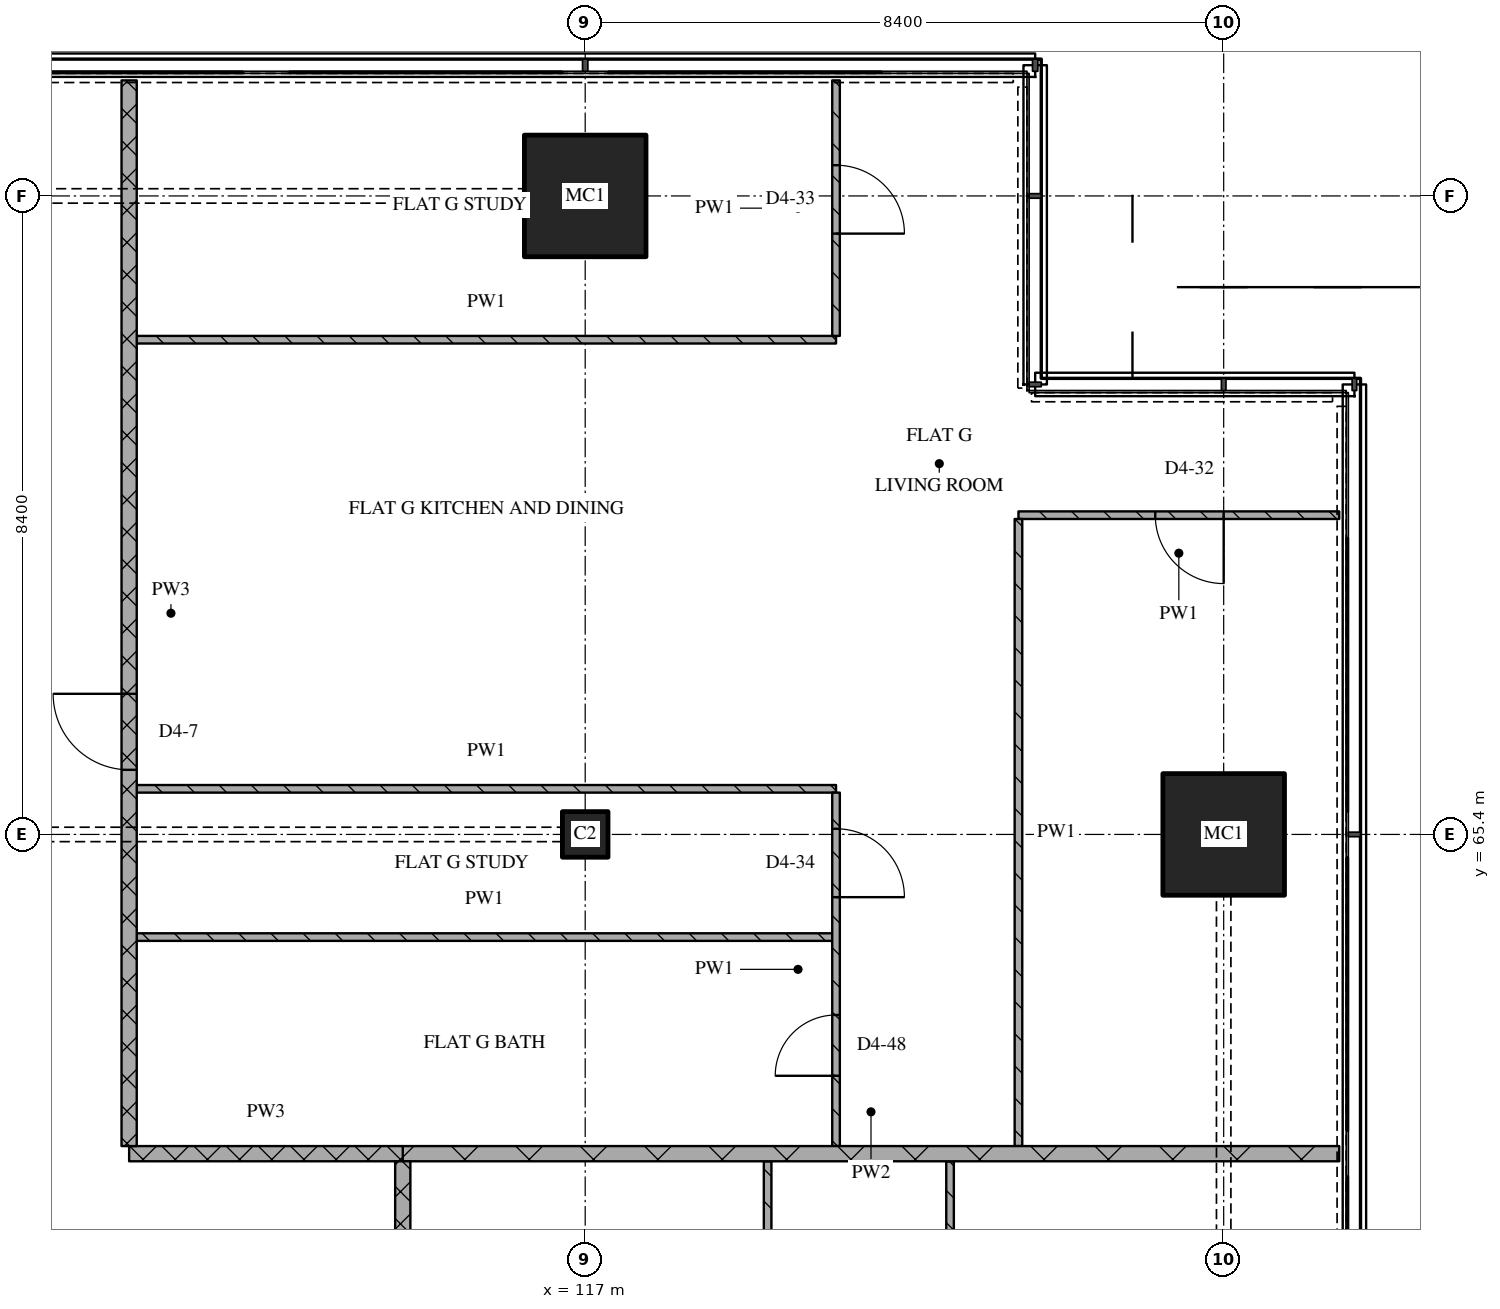
"""IFC4 building model, lengths in metres.
Left out: names, types, materials, properties, quantities, classifications, styles, units other than length and angle.
Written with IfcOpenShell. Run it as: python <this file> out.ifc"""

import sys

from ifc_helpers import new_model, si_unit, direction, frame, frame_2d, origin, origin_2d, place, context, subcontext, project, spatial, rectangle, extrude, element, fill, save


model = new_model("IFC4")
c1 = context("Model", 3, precision=1e-05, world=origin(), true_north=direction((0.0, 1.0)))
c2 = subcontext(c1, "Body", "Model", "MODEL_VIEW")
j1 = project(units=[si_unit("LENGTHUNIT", "METRE"), si_unit("PLANEANGLEUNIT", "RADIAN")], contexts=[c1])
p1 = place(None, origin())
s1 = spatial("IfcSite", under=j1, at=p1, CompositionType="ELEMENT")
p2 = place(p1, origin())
s2 = spatial("IfcBuilding", under=s1, at=p2, CompositionType="ELEMENT")
p3 = place(p2, frame((0.0, 0.0, 245.1)))
s3 = spatial("IfcBuildingStorey", under=s2, at=p3, CompositionType="ELEMENT", Elevation=245.1)
p4 = place(p3, frame((117.0, 65.4, 0.0), z_axis=(0.0, 0.0, 1.0), x_axis=(1.0, 0.0, 0.0)))
e1 = element("IfcColumn", 1, at=p4, inside=s3, PredefinedType="COLUMN", context=c2, shape_type="SweptSolid", body=[
    extrude(rectangle(XDim=0.6, YDim=0.6, at=origin_2d()), origin(), (0.0, 0.0, 1.0), 3.6),
])
for number, where, z_axis, x_axis in (
    (2, (117.0, 73.8, 0.0), (0.0, 0.0, 1.0), (1.0, 0.0, 0.0)),
    (3, (125.4, 65.4, 0.0), (0.0, 0.0, 1.0), (1.0, 0.0, 0.0)),
):
    element("IfcColumn", number, at=place(p3, frame(where, z_axis=z_axis, x_axis=x_axis)), inside=s3, PredefinedType="COLUMN", context=c2, shape_type="SweptSolid", body=[
        extrude(rectangle(XDim=1.6, YDim=1.6, at=origin_2d()), origin(), (0.0, 0.0, 1.0), 3.6),
    ])
p5 = place(p3, frame((111.0, 61.2, 0.0), z_axis=(0.0, 0.0, 1.0), x_axis=(1.0, 0.0, 0.0)))
e4 = element("IfcWall", 4, at=p5, inside=s3, PredefinedType="PARTITIONING", context=c2, shape_type="SweptSolid", body=[
    extrude(rectangle(XDim=3.6, YDim=0.2, at=frame_2d((1.8, 0.0))), origin(), (0.0, 0.0, 1.0), 3.32),
])
p6 = place(p3, frame((114.6, 61.2, 0.0), z_axis=(0.0, 0.0, 1.0), x_axis=(1.0, 0.0, 0.0)))
e5 = element("IfcWall", 5, at=p6, inside=s3, PredefinedType="PARTITIONING", context=c2, shape_type="SweptSolid", body=[
    extrude(rectangle(XDim=12.32, YDim=0.2, at=frame_2d((6.16, 0.0))), origin(), (0.0, 0.0, 1.0), 3.32),
])
p7 = place(p3, frame((111.1, 64.05, 0.0), z_axis=(0.0, 0.0, 1.0), x_axis=(1.0, 0.0, 0.0)))
e6 = element("IfcWall", 6, at=p7, inside=s3, PredefinedType="PARTITIONING", context=c2, shape_type="SweptSolid", body=[
    extrude(rectangle(XDim=9.15, YDim=0.1, at=frame_2d((4.575, 0.0))), origin(), (0.0, 0.0, 1.0), 3.32),
])
p8 = place(p3, frame((111.1, 66.0, 0.0), z_axis=(0.0, 0.0, 1.0), x_axis=(1.0, 0.0, 0.0)))
e7 = element("IfcWall", 7, at=p8, inside=s3, PredefinedType="PARTITIONING", context=c2, shape_type="SweptSolid", body=[
    extrude(rectangle(XDim=9.2, YDim=0.1, at=frame_2d((4.6, 0.0))), origin(), (0.0, 0.0, 1.0), 3.32),
])
p9 = place(p3, frame((126.92, 69.6, 0.0), z_axis=(0.0, 0.0, 1.0), x_axis=(-1.0, 0.0, 0.0)))
e8 = element("IfcWall", 8, at=p9, inside=s3, PredefinedType="PARTITIONING", context=c2, shape_type="SweptSolid", body=[
    extrude(rectangle(XDim=4.22, YDim=0.1, at=frame_2d((2.11, 0.0))), origin(), (0.0, 0.0, 1.0), 3.32),
])
p10 = place(p9, frame((1.52, 0.0, 0.0)))
e9 = element("IfcOpeningElement", 9, at=p10, cuts=e8, PredefinedType="OPENING", context=c2, shape_type="SweptSolid", body=[
    extrude(rectangle(XDim=0.9, YDim=2.1, at=frame_2d((0.45, 1.05))), frame((0.0, 0.06, 0.0), z_axis=(0.0, -1.0, 0.0), x_axis=(1.0, 0.0, 0.0)), (0.0, 0.0, 1.0), 0.12),
])
p11 = place(p3, frame((111.1, 71.909, 0.0), z_axis=(0.0, 0.0, 1.0), x_axis=(1.0, 0.0, 0.0)))
e10 = element("IfcWall", 10, at=p11, inside=s3, PredefinedType="PARTITIONING", context=c2, shape_type="SweptSolid", body=[
    extrude(rectangle(XDim=9.2, YDim=0.1, at=frame_2d((4.6, 0.0))), origin(), (0.0, 0.0, 1.0), 3.32),
])
p12 = place(p3, frame((111.0, 75.32, 0.0), z_axis=(0.0, 0.0, 1.0), x_axis=(0.0, -1.0, 0.0)))
e11 = element("IfcWall", 11, at=p12, inside=s3, PredefinedType="PARTITIONING", context=c2, shape_type="SweptSolid", body=[
    extrude(rectangle(XDim=14.02, YDim=0.2, at=frame_2d((7.01, 0.0))), origin(), (0.0, 0.0, 1.0), 3.32),
])
p13 = place(p12, frame((8.07, 0.0, 0.0)))
e12 = element("IfcOpeningElement", 12, at=p13, cuts=e11, PredefinedType="OPENING", context=c2, shape_type="SweptSolid", body=[
    extrude(rectangle(XDim=1.0, YDim=2.1, at=frame_2d((0.5, 1.05))), frame((0.0, 0.11, 0.0), z_axis=(0.0, -1.0, 0.0), x_axis=(1.0, 0.0, 0.0)), (0.0, 0.0, 1.0), 0.22),
])
p14 = place(p3, frame((114.6, 61.1, 0.0), z_axis=(0.0, 0.0, 1.0), x_axis=(0.0, -1.0, 0.0)))
e13 = element("IfcWall", 13, at=p14, inside=s3, PredefinedType="PARTITIONING", context=c2, shape_type="SweptSolid", body=[
    extrude(rectangle(XDim=17.8, YDim=0.2, at=frame_2d((8.9, 0.0))), origin(), (0.0, 0.0, 1.0), 3.32),
])
p15 = place(p3, frame((119.4, 57.35, 0.0), z_axis=(0.0, 0.0, 1.0), x_axis=(0.0, 1.0, 0.0)))
e14 = element("IfcWall", 14, at=p15, inside=s3, PredefinedType="PARTITIONING", context=c2, shape_type="SweptSolid", body=[
    extrude(rectangle(XDim=3.75, YDim=0.1, at=frame_2d((1.875, 0.0))), origin(), (0.0, 0.0, 1.0), 3.32),
])
p16 = place(p15, frame((1.45, 0.0, 0.0)))
e15 = element("IfcOpeningElement", 15, at=p16, cuts=e14, PredefinedType="OPENING", context=c2, shape_type="SweptSolid", body=[
    extrude(rectangle(XDim=0.9, YDim=2.1, at=frame_2d((0.45, 1.05))), frame((0.0, 0.06, 0.0), z_axis=(0.0, -1.0, 0.0), x_axis=(1.0, 0.0, 0.0)), (0.0, 0.0, 1.0), 0.12),
])
p17 = place(p3, frame((120.3, 61.3, 0.0), z_axis=(0.0, 0.0, 1.0), x_axis=(0.0, 1.0, 0.0)))
e16 = element("IfcWall", 16, at=p17, inside=s3, PredefinedType="PARTITIONING", context=c2, shape_type="SweptSolid", body=[
    extrude(rectangle(XDim=4.65, YDim=0.1, at=frame_2d((2.325, 0.0))), origin(), (0.0, 0.0, 1.0), 3.32),
])
p18 = place(p17, frame((0.925, 0.0, 0.0)))
e17 = element("IfcOpeningElement", 17, at=p18, cuts=e16, PredefinedType="OPENING", context=c2, shape_type="SweptSolid", body=[
    extrude(rectangle(XDim=0.8, YDim=2.1, at=frame_2d((0.4, 1.05))), frame((0.0, 0.06, 0.0), z_axis=(0.0, -1.0, 0.0), x_axis=(1.0, 0.0, 0.0)), (0.0, 0.0, 1.0), 0.12),
])
p19 = place(p17, frame((3.275, 0.0, 0.0)))
e18 = element("IfcOpeningElement", 18, at=p19, cuts=e16, PredefinedType="OPENING", context=c2, shape_type="SweptSolid", body=[
    extrude(rectangle(XDim=0.9, YDim=2.1, at=frame_2d((0.45, 1.05))), frame((0.0, 0.06, 0.0), z_axis=(0.0, -1.0, 0.0), x_axis=(1.0, 0.0, 0.0)), (0.0, 0.0, 1.0), 0.12),
])
p20 = place(p3, frame((120.3, 71.958, 0.0), z_axis=(0.0, 0.0, 1.0), x_axis=(0.0, 1.0, 0.0)))
e19 = element("IfcWall", 19, at=p20, inside=s3, PredefinedType="PARTITIONING", context=c2, shape_type="SweptSolid", body=[
    extrude(rectangle(XDim=3.362, YDim=0.1, at=frame_2d((1.681, 0.0))), origin(), (0.0, 0.0, 1.0), 3.32),
])
p21 = place(p20, frame((1.346, 0.0, 0.0)))
e20 = element("IfcOpeningElement", 20, at=p21, cuts=e19, PredefinedType="OPENING", context=c2, shape_type="SweptSolid", body=[
    extrude(rectangle(XDim=0.9, YDim=2.1, at=frame_2d((0.45, 1.05))), frame((0.0, 0.06, 0.0), z_axis=(0.0, -1.0, 0.0), x_axis=(1.0, 0.0, 0.0)), (0.0, 0.0, 1.0), 0.12),
])
for number, where, z_axis, x_axis in (
    (21, (121.8, 61.1, 0.0), (0.0, 0.0, 1.0), (0.0, -1.0, 0.0)),
    (22, (122.7, 69.55, 0.0), (0.0, 0.0, 1.0), (0.0, -1.0, 0.0)),
):
    element("IfcWall", number, at=place(p3, frame(where, z_axis=z_axis, x_axis=x_axis)), inside=s3, PredefinedType="PARTITIONING", context=c2, shape_type="SweptSolid", body=[
        extrude(rectangle(XDim=8.25, YDim=0.1, at=frame_2d((4.125, 0.0))), origin(), (0.0, 0.0, 1.0), 3.32),
    ])
p22 = place(p10, origin())
e23 = element("IfcDoor", 23, at=p22, inside=s3, OperationType="SINGLE_SWING_LEFT", PredefinedType="DOOR", context=c2, shape_type="SweptSolid", body=[
    extrude(rectangle(XDim=0.9, YDim=2.1, at=frame_2d((0.45, 1.05))), frame((0.0, 0.025, 0.0), z_axis=(0.0, -1.0, 0.0), x_axis=(1.0, 0.0, 0.0)), (0.0, 0.0, 1.0), 0.05),
])
fill(e9, e23)
p23 = place(p13, origin())
e24 = element("IfcDoor", 24, at=p23, inside=s3, OperationType="SINGLE_SWING_RIGHT", PredefinedType="DOOR", context=c2, shape_type="SweptSolid", body=[
    extrude(rectangle(XDim=1.0, YDim=2.1, at=frame_2d((0.5, 1.05))), frame((0.0, 0.025, 0.0), z_axis=(0.0, -1.0, 0.0), x_axis=(1.0, 0.0, 0.0)), (0.0, 0.0, 1.0), 0.05),
])
fill(e12, e24)
p24 = place(p18, origin())
e25 = element("IfcDoor", 25, at=p24, inside=s3, OperationType="SINGLE_SWING_LEFT", PredefinedType="DOOR", context=c2, shape_type="SweptSolid", body=[
    extrude(rectangle(XDim=0.8, YDim=2.1, at=frame_2d((0.4, 1.05))), frame((0.0, 0.025, 0.0), z_axis=(0.0, -1.0, 0.0), x_axis=(1.0, 0.0, 0.0)), (0.0, 0.0, 1.0), 0.05),
])
fill(e17, e25)
p25 = place(p19, origin())
e26 = element("IfcDoor", 26, at=p25, inside=s3, OperationType="SINGLE_SWING_RIGHT", PredefinedType="DOOR", context=c2, shape_type="SweptSolid", body=[
    extrude(rectangle(XDim=0.9, YDim=2.1, at=frame_2d((0.45, 1.05))), frame((0.0, 0.025, 0.0), z_axis=(0.0, -1.0, 0.0), x_axis=(1.0, 0.0, 0.0)), (0.0, 0.0, 1.0), 0.05),
])
fill(e18, e26)
p26 = place(p21, origin())
e27 = element("IfcDoor", 27, at=p26, inside=s3, OperationType="SINGLE_SWING_RIGHT", PredefinedType="DOOR", context=c2, shape_type="SweptSolid", body=[
    extrude(rectangle(XDim=0.9, YDim=2.1, at=frame_2d((0.45, 1.05))), frame((0.0, 0.025, 0.0), z_axis=(0.0, -1.0, 0.0), x_axis=(1.0, 0.0, 0.0)), (0.0, 0.0, 1.0), 0.05),
])
fill(e20, e27)
save(model, sys.argv[1])
